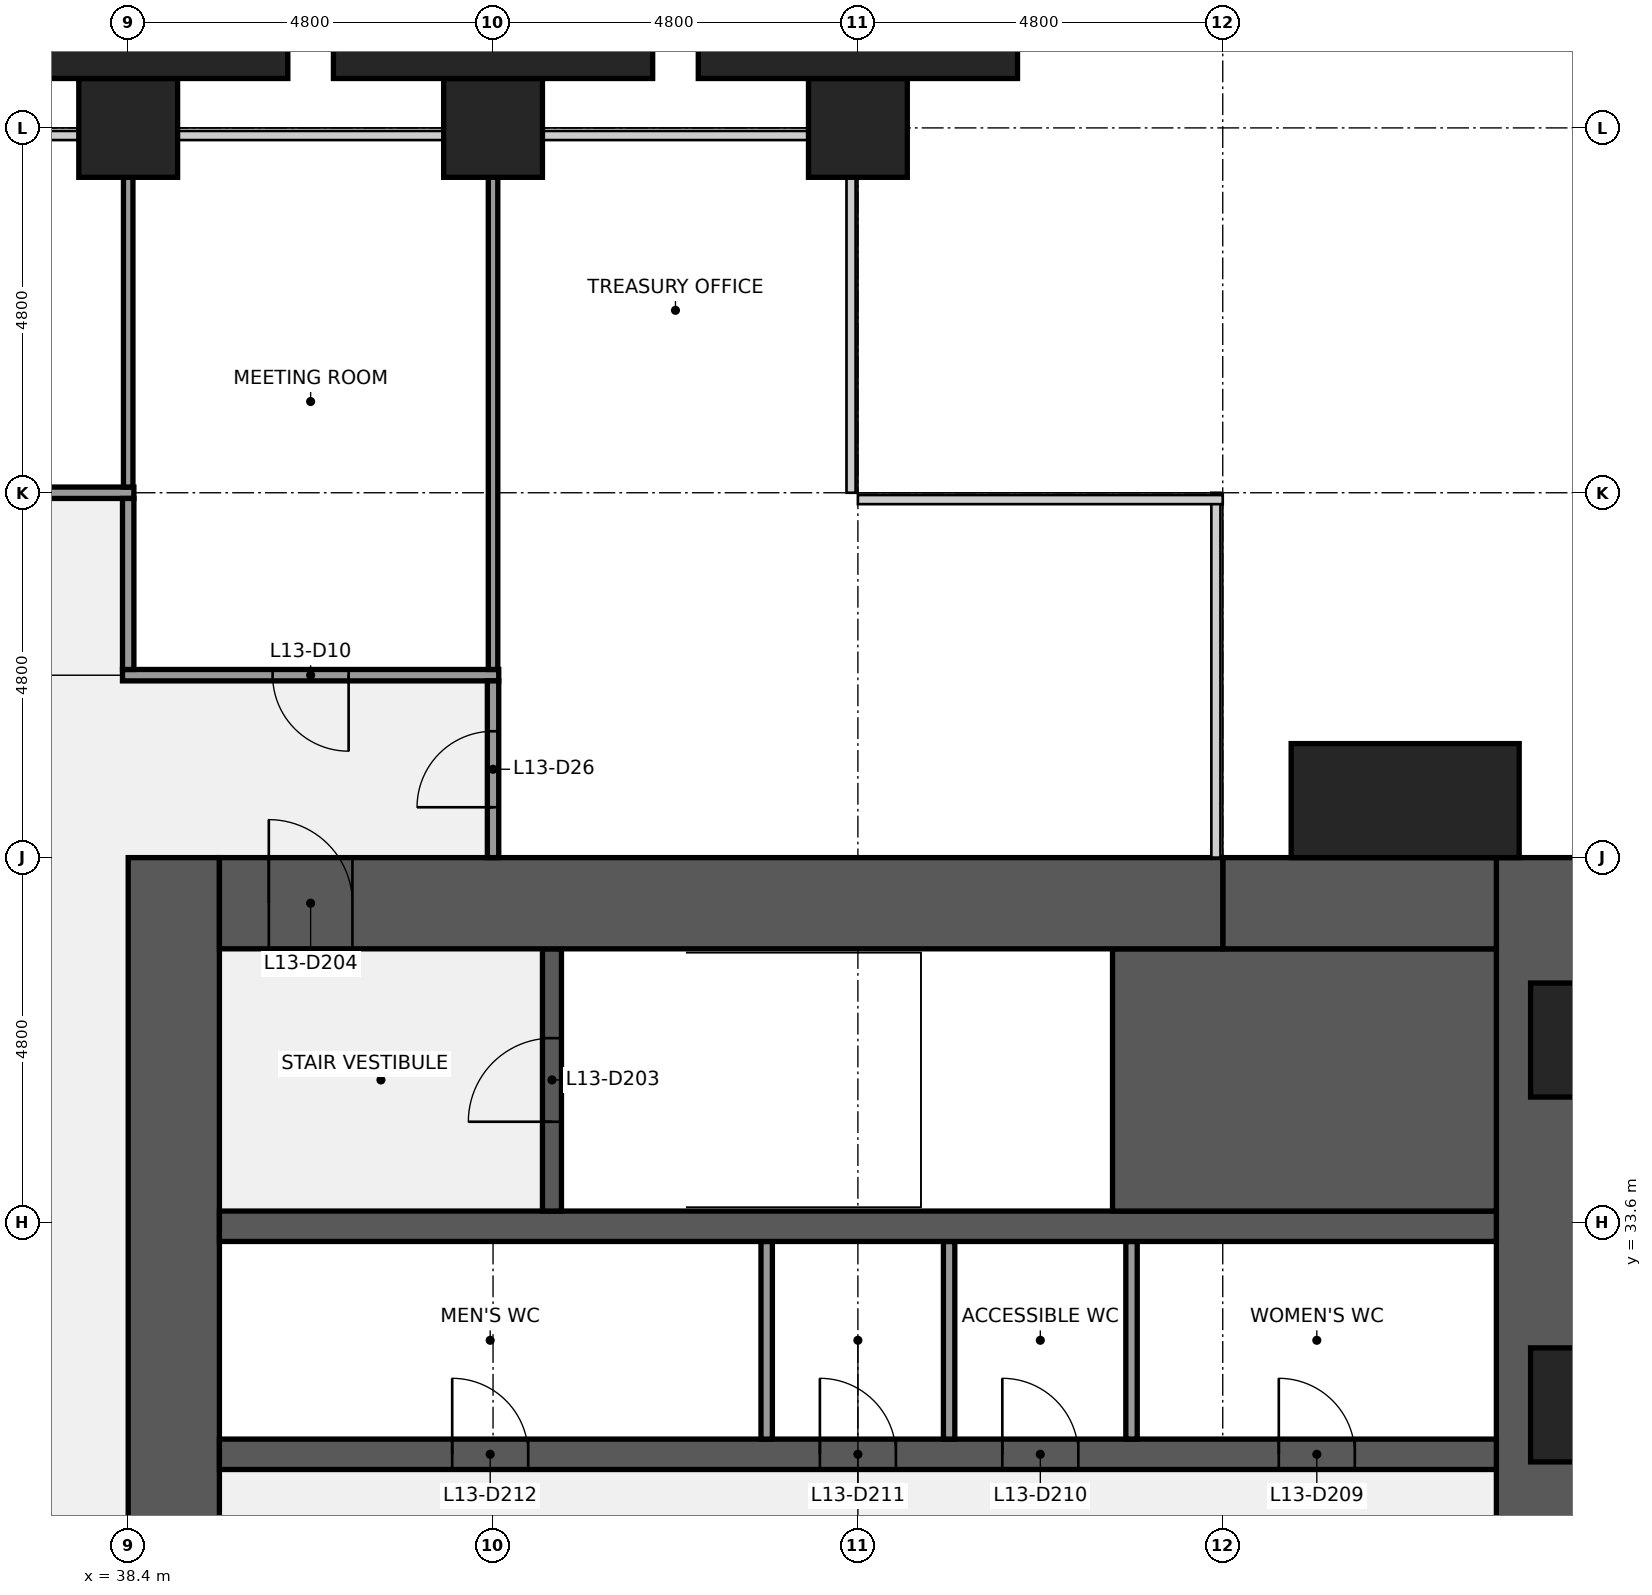
"""IFC4 building model, lengths in metres.
Left out: names, types, materials, properties, quantities, classifications, styles, units other than length and angle.
Written with IfcOpenShell. Run it as: python <this file> out.ifc"""

import sys

from ifc_helpers import new_model, si_unit, direction, frame, frame_2d, origin, origin_2d, place, context, subcontext, project, spatial, rectangle, extrude, element, fill, save


model = new_model("IFC4")
c1 = context("Model", 3, precision=1e-05, world=origin(), true_north=direction((0.0, 1.0)))
c2 = subcontext(c1, "Body", "Model", "MODEL_VIEW")
j1 = project(units=[si_unit("LENGTHUNIT", "METRE"), si_unit("PLANEANGLEUNIT", "RADIAN")], contexts=[c1])
p1 = place(None, origin())
s1 = spatial("IfcSite", under=j1, at=p1, CompositionType="ELEMENT")
p2 = place(p1, origin())
s2 = spatial("IfcBuilding", under=s1, at=p2, CompositionType="ELEMENT")
p3 = place(p2, frame((0.0, 0.0, 63.0)))
s3 = spatial("IfcBuildingStorey", under=s2, at=p3, CompositionType="ELEMENT", Elevation=63.0)
for number, where, z_axis, x_axis in (
    (1, (38.4, 48.0, 0.0), (0.0, 0.0, 1.0), (1.0, 0.0, 0.0)),
    (2, (43.2, 48.0, 0.0), (0.0, 0.0, 1.0), (1.0, 0.0, 0.0)),
    (3, (48.0, 48.0, 0.0), (0.0, 0.0, 1.0), (1.0, 0.0, 0.0)),
):
    element("IfcColumn", number, at=place(p3, frame(where, z_axis=z_axis, x_axis=x_axis)), inside=s3, PredefinedType="COLUMN", context=c2, shape_type="SweptSolid", body=[
        extrude(rectangle(XDim=1.3, YDim=1.3, at=origin_2d()), origin(), (0.0, 0.0, 1.0), 4.0),
    ])
p4 = place(p3, frame((57.0, 38.4, 0.0), z_axis=(0.0, 0.0, 1.0), x_axis=(0.0, -1.0, 0.0)))
e4 = element("IfcWall", 4, at=p4, inside=s3, PredefinedType="SHEAR", context=c2, shape_type="SweptSolid", body=[
    extrude(rectangle(XDim=28.8, YDim=1.2, at=frame_2d((14.4, 0.0))), origin(), (0.0, 0.0, 1.0), 3.84),
])
p5 = place(p4, frame((18.45, 0.0, 0.9)))
e5 = element("IfcOpeningElement", 5, at=p5, cuts=e4, PredefinedType="OPENING", context=c2, shape_type="SweptSolid", body=[
    extrude(rectangle(XDim=1.5, YDim=1.5, at=frame_2d((0.75, 0.75))), frame((0.0, 0.61, 0.0), z_axis=(0.0, -1.0, 0.0), x_axis=(1.0, 0.0, 0.0)), (0.0, 0.0, 1.0), 1.22),
])
p6 = place(p4, frame((8.85, 0.0, 0.9)))
e6 = element("IfcOpeningElement", 6, at=p6, cuts=e4, PredefinedType="OPENING", context=c2, shape_type="SweptSolid", body=[
    extrude(rectangle(XDim=1.5, YDim=1.5, at=frame_2d((0.75, 0.75))), frame((0.0, 0.61, 0.0), z_axis=(0.0, -1.0, 0.0), x_axis=(1.0, 0.0, 0.0)), (0.0, 0.0, 1.0), 1.22),
])
p7 = place(p3, frame((39.0, 9.6, 0.0), z_axis=(0.0, 0.0, 1.0), x_axis=(0.0, 1.0, 0.0)))
e7 = element("IfcWall", 7, at=p7, inside=s3, PredefinedType="SHEAR", context=c2, shape_type="SweptSolid", body=[
    extrude(rectangle(XDim=28.8, YDim=1.2, at=frame_2d((14.4, 0.0))), origin(), (0.0, 0.0, 1.0), 3.84),
])
p8 = place(p7, frame((8.7, 0.0, 0.0)))
e8 = element("IfcOpeningElement", 8, at=p8, cuts=e7, PredefinedType="OPENING", context=c2, shape_type="SweptSolid", body=[
    extrude(rectangle(XDim=1.8, YDim=2.1, at=frame_2d((0.9, 1.05))), frame((0.0, 0.61, 0.0), z_axis=(0.0, -1.0, 0.0), x_axis=(1.0, 0.0, 0.0)), (0.0, 0.0, 1.0), 1.22),
])
p9 = place(p7, frame((18.3, 0.0, 0.0)))
e9 = element("IfcOpeningElement", 9, at=p9, cuts=e7, PredefinedType="OPENING", context=c2, shape_type="SweptSolid", body=[
    extrude(rectangle(XDim=1.8, YDim=2.1, at=frame_2d((0.9, 1.05))), frame((0.0, 0.61, 0.0), z_axis=(0.0, -1.0, 0.0), x_axis=(1.0, 0.0, 0.0)), (0.0, 0.0, 1.0), 1.22),
])
p10 = place(p3, frame((39.6, 30.55, 0.0), z_axis=(0.0, 0.0, 1.0), x_axis=(1.0, 0.0, 0.0)))
e10 = element("IfcWall", 10, at=p10, inside=s3, PredefinedType="SHEAR", context=c2, shape_type="SweptSolid", body=[
    extrude(rectangle(XDim=16.8, YDim=0.4, at=frame_2d((8.4, 0.0))), origin(), (0.0, 0.0, 1.0), 3.84),
])
p11 = place(p10, frame((13.938, 0.0, 0.0)))
e11 = element("IfcOpeningElement", 11, at=p11, cuts=e10, PredefinedType="OPENING", context=c2, shape_type="SweptSolid", body=[
    extrude(rectangle(XDim=1.0, YDim=2.1, at=frame_2d((0.5, 1.05))), frame((0.0, 0.21, 0.0), z_axis=(0.0, -1.0, 0.0), x_axis=(1.0, 0.0, 0.0)), (0.0, 0.0, 1.0), 0.42),
])
p12 = place(p10, frame((10.3, 0.0, 0.0)))
e12 = element("IfcOpeningElement", 12, at=p12, cuts=e10, PredefinedType="OPENING", context=c2, shape_type="SweptSolid", body=[
    extrude(rectangle(XDim=1.0, YDim=2.1, at=frame_2d((0.5, 1.05))), frame((0.0, 0.21, 0.0), z_axis=(0.0, -1.0, 0.0), x_axis=(1.0, 0.0, 0.0)), (0.0, 0.0, 1.0), 0.42),
])
p13 = place(p10, frame((7.9, 0.0, 0.0)))
e13 = element("IfcOpeningElement", 13, at=p13, cuts=e10, PredefinedType="OPENING", context=c2, shape_type="SweptSolid", body=[
    extrude(rectangle(XDim=1.0, YDim=2.1, at=frame_2d((0.5, 1.05))), frame((0.0, 0.21, 0.0), z_axis=(0.0, -1.0, 0.0), x_axis=(1.0, 0.0, 0.0)), (0.0, 0.0, 1.0), 0.42),
])
p14 = place(p10, frame((3.062, 0.0, 0.0)))
e14 = element("IfcOpeningElement", 14, at=p14, cuts=e10, PredefinedType="OPENING", context=c2, shape_type="SweptSolid", body=[
    extrude(rectangle(XDim=1.0, YDim=2.1, at=frame_2d((0.5, 1.05))), frame((0.0, 0.21, 0.0), z_axis=(0.0, -1.0, 0.0), x_axis=(1.0, 0.0, 0.0)), (0.0, 0.0, 1.0), 0.42),
])
for number, where, z_axis, x_axis in (
    (15, (51.6, 30.75, 0.0), (0.0, 0.0, 1.0), (0.0, 1.0, 0.0)),
    (16, (49.2, 30.75, 0.0), (0.0, 0.0, 1.0), (0.0, 1.0, 0.0)),
    (17, (46.8, 30.75, 0.0), (0.0, 0.0, 1.0), (0.0, 1.0, 0.0)),
):
    element("IfcWall", number, at=place(p3, frame(where, z_axis=z_axis, x_axis=x_axis)), inside=s3, PredefinedType="PARTITIONING", context=c2, shape_type="SweptSolid", body=[
        extrude(rectangle(XDim=2.6, YDim=0.15, at=frame_2d((1.3, 0.0))), origin(), (0.0, 0.0, 1.0), 3.84),
    ])
p15 = place(p3, frame((39.6, 33.55, 0.0), z_axis=(0.0, 0.0, 1.0), x_axis=(1.0, 0.0, 0.0)))
e18 = element("IfcWall", 18, at=p15, inside=s3, PredefinedType="SHEAR", context=c2, shape_type="SweptSolid", body=[
    extrude(rectangle(XDim=16.8, YDim=0.4, at=frame_2d((8.4, 0.0))), origin(), (0.0, 0.0, 1.0), 3.84),
])
p16 = place(p3, frame((51.35, 35.475, 0.0), z_axis=(0.0, 0.0, 1.0), x_axis=(1.0, 0.0, 0.0)))
e19 = element("IfcWall", 19, at=p16, inside=s3, PredefinedType="SHEAR", context=c2, shape_type="SweptSolid", body=[
    extrude(rectangle(XDim=5.05, YDim=3.45, at=frame_2d((2.525, 0.0))), origin(), (0.0, 0.0, 1.0), 3.84),
])
p17 = place(p3, frame((43.975, 33.75, 0.0), z_axis=(0.0, 0.0, 1.0), x_axis=(0.0, 1.0, 0.0)))
e20 = element("IfcWall", 20, at=p17, inside=s3, PredefinedType="SHEAR", context=c2, shape_type="SweptSolid", body=[
    extrude(rectangle(XDim=3.45, YDim=0.25, at=frame_2d((1.725, 0.0))), origin(), (0.0, 0.0, 1.0), 3.84),
])
p18 = place(p17, frame((1.175, 0.0, 0.0)))
e21 = element("IfcOpeningElement", 21, at=p18, cuts=e20, PredefinedType="OPENING", context=c2, shape_type="SweptSolid", body=[
    extrude(rectangle(XDim=1.1, YDim=2.1, at=frame_2d((0.55, 1.05))), frame((0.0, 0.135, 0.0), z_axis=(0.0, -1.0, 0.0), x_axis=(1.0, 0.0, 0.0)), (0.0, 0.0, 1.0), 0.27),
])
p19 = place(p3, frame((52.8, 37.8, 0.0), z_axis=(0.0, 0.0, 1.0), x_axis=(1.0, 0.0, 0.0)))
e22 = element("IfcWall", 22, at=p19, inside=s3, PredefinedType="SHEAR", context=c2, shape_type="SweptSolid", body=[
    extrude(rectangle(XDim=3.6, YDim=1.2, at=frame_2d((1.8, 0.0))), origin(), (0.0, 0.0, 1.0), 3.84),
])
p20 = place(p3, frame((39.6, 37.8, 0.0), z_axis=(0.0, 0.0, 1.0), x_axis=(1.0, 0.0, 0.0)))
e23 = element("IfcWall", 23, at=p20, inside=s3, PredefinedType="SHEAR", context=c2, shape_type="SweptSolid", body=[
    extrude(rectangle(XDim=13.2, YDim=1.2, at=frame_2d((6.6, 0.0))), origin(), (0.0, 0.0, 1.0), 3.84),
])
p21 = place(p20, frame((0.65, 0.0, 0.0)))
e24 = element("IfcOpeningElement", 24, at=p21, cuts=e23, PredefinedType="OPENING", context=c2, shape_type="SweptSolid", body=[
    extrude(rectangle(XDim=1.1, YDim=2.1, at=frame_2d((0.55, 1.05))), frame((0.0, 0.61, 0.0), z_axis=(0.0, -1.0, 0.0), x_axis=(1.0, 0.0, 0.0)), (0.0, 0.0, 1.0), 1.22),
])
p22 = place(p3, frame((38.325, 40.8, 0.0), z_axis=(0.0, 0.0, 1.0), x_axis=(1.0, 0.0, 0.0)))
e25 = element("IfcWall", 25, at=p22, inside=s3, PredefinedType="PARTITIONING", context=c2, shape_type="SweptSolid", body=[
    extrude(rectangle(XDim=4.95, YDim=0.15, at=frame_2d((2.475, 0.0))), origin(), (0.0, 0.0, 1.0), 2.87),
])
p23 = place(p22, frame((1.975, 0.0, 0.0)))
e26 = element("IfcOpeningElement", 26, at=p23, cuts=e25, PredefinedType="OPENING", context=c2, shape_type="SweptSolid", body=[
    extrude(rectangle(XDim=1.0, YDim=2.1, at=frame_2d((0.5, 1.05))), frame((0.0, 0.085, 0.0), z_axis=(0.0, -1.0, 0.0), x_axis=(1.0, 0.0, 0.0)), (0.0, 0.0, 1.0), 0.17),
])
p24 = place(p3, frame((19.125, 43.2, 0.0), z_axis=(0.0, 0.0, 1.0), x_axis=(1.0, 0.0, 0.0)))
e27 = element("IfcWall", 27, at=p24, inside=s3, PredefinedType="PARTITIONING", context=c2, shape_type="SweptSolid", body=[
    extrude(rectangle(XDim=19.35, YDim=0.15, at=frame_2d((9.675, 0.0))), origin(), (0.0, 0.0, 1.0), 2.87),
])
p25 = place(p24, frame((0.775, 0.0, 0.0)))
e28 = element("IfcOpeningElement", 28, at=p25, cuts=e27, PredefinedType="OPENING", context=c2, shape_type="SweptSolid", body=[
    extrude(rectangle(XDim=1.0, YDim=2.1, at=frame_2d((0.5, 1.05))), frame((0.0, 0.085, 0.0), z_axis=(0.0, -1.0, 0.0), x_axis=(1.0, 0.0, 0.0)), (0.0, 0.0, 1.0), 0.17),
])
p26 = place(p24, frame((3.175, 0.0, 0.0)))
e29 = element("IfcOpeningElement", 29, at=p26, cuts=e27, PredefinedType="OPENING", context=c2, shape_type="SweptSolid", body=[
    extrude(rectangle(XDim=1.0, YDim=2.1, at=frame_2d((0.5, 1.05))), frame((0.0, 0.085, 0.0), z_axis=(0.0, -1.0, 0.0), x_axis=(1.0, 0.0, 0.0)), (0.0, 0.0, 1.0), 0.17),
])
p27 = place(p24, frame((9.175, 0.0, 0.0)))
e30 = element("IfcOpeningElement", 30, at=p27, cuts=e27, PredefinedType="OPENING", context=c2, shape_type="SweptSolid", body=[
    extrude(rectangle(XDim=1.0, YDim=2.1, at=frame_2d((0.5, 1.05))), frame((0.0, 0.085, 0.0), z_axis=(0.0, -1.0, 0.0), x_axis=(1.0, 0.0, 0.0)), (0.0, 0.0, 1.0), 0.17),
])
p28 = place(p24, frame((16.375, 0.0, 0.0)))
e31 = element("IfcOpeningElement", 31, at=p28, cuts=e27, PredefinedType="OPENING", context=c2, shape_type="SweptSolid", body=[
    extrude(rectangle(XDim=1.0, YDim=2.1, at=frame_2d((0.5, 1.05))), frame((0.0, 0.085, 0.0), z_axis=(0.0, -1.0, 0.0), x_axis=(1.0, 0.0, 0.0)), (0.0, 0.0, 1.0), 0.17),
])
p29 = place(p3, frame((38.4, 43.275, 0.0), z_axis=(0.0, 0.0, 1.0), x_axis=(0.0, 1.0, 0.0)))
e32 = element("IfcWall", 32, at=p29, inside=s3, PredefinedType="PARTITIONING", context=c2, shape_type="SweptSolid", body=[
    extrude(rectangle(XDim=4.075, YDim=0.125, at=frame_2d((2.038, 0.0))), origin(), (0.0, 0.0, 1.0), 2.87),
])
p30 = place(p3, frame((38.4, 40.875, 0.0), z_axis=(0.0, 0.0, 1.0), x_axis=(0.0, 1.0, 0.0)))
e33 = element("IfcWall", 33, at=p30, inside=s3, PredefinedType="PARTITIONING", context=c2, shape_type="SweptSolid", body=[
    extrude(rectangle(XDim=2.25, YDim=0.15, at=frame_2d((1.125, 0.0))), origin(), (0.0, 0.0, 1.0), 2.87),
])
p31 = place(p3, frame((43.2, 40.875, 0.0), z_axis=(0.0, 0.0, 1.0), x_axis=(0.0, 1.0, 0.0)))
e34 = element("IfcWall", 34, at=p31, inside=s3, PredefinedType="PARTITIONING", context=c2, shape_type="SweptSolid", body=[
    extrude(rectangle(XDim=6.475, YDim=0.125, at=frame_2d((3.238, 0.0))), origin(), (0.0, 0.0, 1.0), 2.87),
])
p32 = place(p3, frame((43.2, 38.4, 0.0), z_axis=(0.0, 0.0, 1.0), x_axis=(0.0, 1.0, 0.0)))
e35 = element("IfcWall", 35, at=p32, inside=s3, PredefinedType="PARTITIONING", context=c2, shape_type="SweptSolid", body=[
    extrude(rectangle(XDim=2.325, YDim=0.15, at=frame_2d((1.163, 0.0))), origin(), (0.0, 0.0, 1.0), 2.87),
])
p33 = place(p32, frame((0.663, 0.0, 0.0)))
e36 = element("IfcOpeningElement", 36, at=p33, cuts=e35, PredefinedType="OPENING", context=c2, shape_type="SweptSolid", body=[
    extrude(rectangle(XDim=1.0, YDim=2.1, at=frame_2d((0.5, 1.05))), frame((0.0, 0.085, 0.0), z_axis=(0.0, -1.0, 0.0), x_axis=(1.0, 0.0, 0.0)), (0.0, 0.0, 1.0), 0.17),
])
p34 = place(p3, frame((55.2, 39.15, 0.0), z_axis=(0.0, 0.0, 1.0), x_axis=(1.0, 0.0, 0.0)))
e37 = element("IfcColumn", 37, at=p34, inside=s3, PredefinedType="PILASTER", context=c2, shape_type="SweptSolid", body=[
    extrude(rectangle(XDim=3.0, YDim=1.5, at=origin_2d()), origin(), (0.0, 0.0, 1.0), 4.0),
])
for number, where, z_axis, x_axis in (
    (38, (38.4, 49.075, 0.0), (0.0, 0.0, 1.0), (1.0, 0.0, 0.0)),
    (39, (43.2, 49.075, 0.0), (0.0, 0.0, 1.0), (1.0, 0.0, 0.0)),
    (40, (48.0, 49.075, 0.0), (0.0, 0.0, 1.0), (1.0, 0.0, 0.0)),
):
    element("IfcColumn", number, at=place(p3, frame(where, z_axis=z_axis, x_axis=x_axis)), inside=s3, PredefinedType="PILASTER", context=c2, shape_type="SweptSolid", body=[
        extrude(rectangle(XDim=4.2, YDim=0.85, at=origin_2d()), origin(), (0.0, 0.0, 1.0), 4.0),
    ])
p35 = place(p18, origin())
e41 = element("IfcDoor", 41, at=p35, inside=s3, OperationType="SINGLE_SWING_LEFT", PredefinedType="DOOR", context=c2, shape_type="SweptSolid", body=[
    extrude(rectangle(XDim=1.1, YDim=2.1, at=frame_2d((0.55, 1.05))), frame((0.0, 0.025, 0.0), z_axis=(0.0, -1.0, 0.0), x_axis=(1.0, 0.0, 0.0)), (0.0, 0.0, 1.0), 0.05),
])
fill(e21, e41)
p36 = place(p21, origin())
e42 = element("IfcDoor", 42, at=p36, inside=s3, OperationType="SINGLE_SWING_LEFT", PredefinedType="DOOR", context=c2, shape_type="SweptSolid", body=[
    extrude(rectangle(XDim=1.1, YDim=2.1, at=frame_2d((0.55, 1.05))), frame((0.0, 0.025, 0.0), z_axis=(0.0, -1.0, 0.0), x_axis=(1.0, 0.0, 0.0)), (0.0, 0.0, 1.0), 0.05),
])
fill(e24, e42)
p37 = place(p11, origin())
e43 = element("IfcDoor", 43, at=p37, inside=s3, OperationType="SINGLE_SWING_LEFT", PredefinedType="DOOR", context=c2, shape_type="SweptSolid", body=[
    extrude(rectangle(XDim=1.0, YDim=2.1, at=frame_2d((0.5, 1.05))), frame((0.0, 0.025, 0.0), z_axis=(0.0, -1.0, 0.0), x_axis=(1.0, 0.0, 0.0)), (0.0, 0.0, 1.0), 0.05),
])
fill(e11, e43)
p38 = place(p12, origin())
e44 = element("IfcDoor", 44, at=p38, inside=s3, OperationType="SINGLE_SWING_LEFT", PredefinedType="DOOR", context=c2, shape_type="SweptSolid", body=[
    extrude(rectangle(XDim=1.0, YDim=2.1, at=frame_2d((0.5, 1.05))), frame((0.0, 0.025, 0.0), z_axis=(0.0, -1.0, 0.0), x_axis=(1.0, 0.0, 0.0)), (0.0, 0.0, 1.0), 0.05),
])
fill(e12, e44)
p39 = place(p13, origin())
e45 = element("IfcDoor", 45, at=p39, inside=s3, OperationType="SINGLE_SWING_LEFT", PredefinedType="DOOR", context=c2, shape_type="SweptSolid", body=[
    extrude(rectangle(XDim=1.0, YDim=2.1, at=frame_2d((0.5, 1.05))), frame((0.0, 0.025, 0.0), z_axis=(0.0, -1.0, 0.0), x_axis=(1.0, 0.0, 0.0)), (0.0, 0.0, 1.0), 0.05),
])
fill(e13, e45)
p40 = place(p14, origin())
e46 = element("IfcDoor", 46, at=p40, inside=s3, OperationType="SINGLE_SWING_LEFT", PredefinedType="DOOR", context=c2, shape_type="SweptSolid", body=[
    extrude(rectangle(XDim=1.0, YDim=2.1, at=frame_2d((0.5, 1.05))), frame((0.0, 0.025, 0.0), z_axis=(0.0, -1.0, 0.0), x_axis=(1.0, 0.0, 0.0)), (0.0, 0.0, 1.0), 0.05),
])
fill(e14, e46)
p41 = place(p23, origin())
e47 = element("IfcDoor", 47, at=p41, inside=s3, OperationType="SINGLE_SWING_RIGHT", PredefinedType="DOOR", context=c2, shape_type="SweptSolid", body=[
    extrude(rectangle(XDim=1.0, YDim=2.1, at=frame_2d((0.5, 1.05))), frame((0.0, 0.025, 0.0), z_axis=(0.0, -1.0, 0.0), x_axis=(1.0, 0.0, 0.0)), (0.0, 0.0, 1.0), 0.05),
])
fill(e26, e47)
p42 = place(p33, origin())
e48 = element("IfcDoor", 48, at=p42, inside=s3, OperationType="SINGLE_SWING_LEFT", PredefinedType="DOOR", context=c2, shape_type="SweptSolid", body=[
    extrude(rectangle(XDim=1.0, YDim=2.1, at=frame_2d((0.5, 1.05))), frame((0.0, 0.025, 0.0), z_axis=(0.0, -1.0, 0.0), x_axis=(1.0, 0.0, 0.0)), (0.0, 0.0, 1.0), 0.05),
])
fill(e36, e48)
save(model, sys.argv[1])
